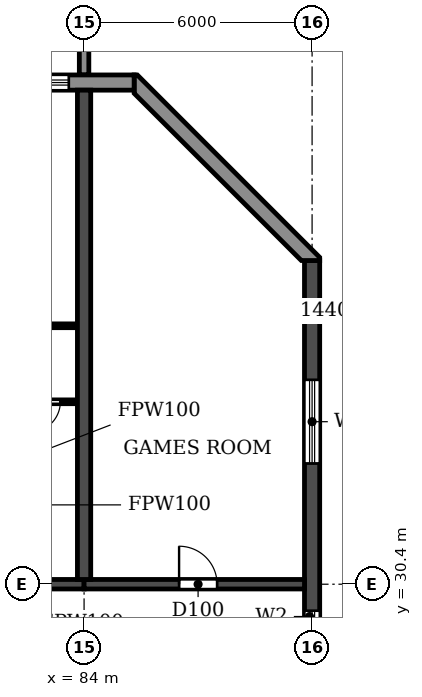
"""IFC4 building model, lengths in metres.
Left out: names, types, materials, properties, quantities, classifications, styles, units other than length and angle.
Written with IfcOpenShell. Run it as: python <this file> out.ifc"""

import sys

from ifc_helpers import new_model, si_unit, direction, frame, frame_2d, origin, place, context, subcontext, project, spatial, polyline, rectangle, outline, extrude, source, transform, mapped, element, fill, save


model = new_model("IFC4")
c1 = context("Model", 3, precision=1e-05, world=origin(), true_north=direction((0.0, 1.0)))
c2 = subcontext(c1, "Body", "Model", "MODEL_VIEW")
j1 = project(units=[si_unit("LENGTHUNIT", "METRE"), si_unit("PLANEANGLEUNIT", "RADIAN")], contexts=[c1])
p1 = place(None, origin())
s1 = spatial("IfcSite", under=j1, at=p1, CompositionType="ELEMENT")
p2 = place(p1, origin())
s2 = spatial("IfcBuilding", under=s1, at=p2, CompositionType="ELEMENT")
p3 = place(p2, frame((0.0, 0.0, 109.2)))
s3 = spatial("IfcBuildingStorey", under=s2, at=p3, CompositionType="ELEMENT", Elevation=109.2)
p4 = place(p3, frame((84.0, 30.525, 0.0), z_axis=(0.0, 0.0, 1.0), x_axis=(0.0, 1.0, 0.0)))
e1 = element("IfcWall", 1, at=p4, inside=s3, PredefinedType="SHEAR", context=c2, shape_type="SweptSolid", body=[
    extrude(rectangle(XDim=12.875, YDim=0.35, at=frame_2d((6.438, 0.0))), origin(), (0.0, 0.0, 1.0), 3.06),
])
p5 = place(p3, frame((90.0, 4.683, 0.0), z_axis=(0.0, 0.0, 1.0), x_axis=(0.0, 1.0, 0.0)))
e2 = element("IfcWall", 2, at=p5, inside=s3, PredefinedType="SHEAR", context=c2, shape_type="SweptSolid", body=[
    extrude(rectangle(XDim=34.234, YDim=0.4, at=frame_2d((17.117, 0.0))), origin(), (0.0, 0.0, 1.0), 3.06),
])
p6 = place(p5, frame((15.917, 0.0, 0.9)))
e3 = element("IfcOpeningElement", 3, at=p6, cuts=e2, PredefinedType="OPENING", context=c2, shape_type="SweptSolid", body=[
    extrude(rectangle(XDim=1.2, YDim=1.5, at=frame_2d((0.6, 0.75))), frame((0.0, 0.21, 0.0), z_axis=(0.0, -1.0, 0.0), x_axis=(1.0, 0.0, 0.0)), (0.0, 0.0, 1.0), 0.42),
])
p7 = place(p5, frame((23.817, 0.0, 0.9)))
e4 = element("IfcOpeningElement", 4, at=p7, cuts=e2, PredefinedType="OPENING", context=c2, shape_type="SweptSolid", body=[
    extrude(rectangle(XDim=1.2, YDim=1.5, at=frame_2d((0.6, 0.75))), frame((0.0, 0.21, 0.0), z_axis=(0.0, -1.0, 0.0), x_axis=(1.0, 0.0, 0.0)), (0.0, 0.0, 1.0), 0.42),
])
p8 = place(p5, frame((8.017, 0.0, 0.9)))
e5 = element("IfcOpeningElement", 5, at=p8, cuts=e2, PredefinedType="OPENING", context=c2, shape_type="SweptSolid", body=[
    extrude(rectangle(XDim=1.2, YDim=1.5, at=frame_2d((0.6, 0.75))), frame((0.0, 0.21, 0.0), z_axis=(0.0, -1.0, 0.0), x_axis=(1.0, 0.0, 0.0)), (0.0, 0.0, 1.0), 0.42),
])
p9 = place(p5, frame((28.894, 0.0, 0.6)))
e6 = element("IfcOpeningElement", 6, at=p9, cuts=e2, PredefinedType="OPENING", context=c2, shape_type="SweptSolid", body=[
    extrude(rectangle(XDim=2.2, YDim=1.8, at=frame_2d((1.1, 0.9))), frame((0.0, 0.21, 0.0), z_axis=(0.0, -1.0, 0.0), x_axis=(1.0, 0.0, 0.0)), (0.0, 0.0, 1.0), 0.42),
])
p10 = place(p5, frame((2.541, 0.0, 0.6)))
e7 = element("IfcOpeningElement", 7, at=p10, cuts=e2, PredefinedType="OPENING", context=c2, shape_type="SweptSolid", body=[
    extrude(rectangle(XDim=2.2, YDim=1.8, at=frame_2d((1.1, 0.9))), frame((0.0, 0.21, 0.0), z_axis=(0.0, -1.0, 0.0), x_axis=(1.0, 0.0, 0.0)), (0.0, 0.0, 1.0), 0.42),
])
p11 = place(p3, frame((78.0, 30.4, 0.0), z_axis=(0.0, 0.0, 1.0), x_axis=(1.0, 0.0, 0.0)))
e8 = element("IfcWall", 8, at=p11, inside=s3, PredefinedType="SHEAR", context=c2, shape_type="SweptSolid", body=[
    extrude(rectangle(XDim=6.0, YDim=0.25, at=frame_2d((3.0, 0.0))), origin(), (0.0, 0.0, 1.0), 2.46),
])
p12 = place(p11, frame((2.55, 0.0, 0.0)))
e9 = element("IfcOpeningElement", 9, at=p12, cuts=e8, PredefinedType="OPENING", context=c2, shape_type="SweptSolid", body=[
    extrude(rectangle(XDim=1.0, YDim=2.1, at=frame_2d((0.5, 1.05))), frame((0.0, 0.135, 0.0), z_axis=(0.0, -1.0, 0.0), x_axis=(1.0, 0.0, 0.0)), (0.0, 0.0, 1.0), 0.27),
])
p13 = place(p3, frame((84.0, 30.4, 0.0), z_axis=(0.0, 0.0, 1.0), x_axis=(1.0, 0.0, 0.0)))
e10 = element("IfcWall", 10, at=p13, inside=s3, PredefinedType="SHEAR", context=c2, shape_type="SweptSolid", body=[
    extrude(rectangle(XDim=5.8, YDim=0.25, at=frame_2d((2.9, 0.0))), origin(), (0.0, 0.0, 1.0), 2.46),
])
p14 = place(p13, frame((2.5, 0.0, 0.0)))
e11 = element("IfcOpeningElement", 11, at=p14, cuts=e10, PredefinedType="OPENING", context=c2, shape_type="SweptSolid", body=[
    extrude(rectangle(XDim=1.0, YDim=2.1, at=frame_2d((0.5, 1.05))), frame((0.0, 0.135, 0.0), z_axis=(0.0, -1.0, 0.0), x_axis=(1.0, 0.0, 0.0)), (0.0, 0.0, 1.0), 0.27),
])
p15 = place(p3, origin())
e12 = element("IfcWall", 12, at=p15, inside=s3, PredefinedType="STANDARD", context=c2, shape_type="SweptSolid", body=[
    extrude(outline(polyline([(90.2, 38.917), (90.2, 39.0), (85.4, 43.8), (85.317, 43.8), (85.317, 43.317), (89.717, 38.917), (90.2, 38.917)])), origin(), (0.0, 0.0, 1.0), 3.06),
])
p16 = place(p3, frame((85.317, 43.6, 0.0), z_axis=(0.0, 0.0, 1.0), x_axis=(-1.0, 0.0, 0.0)))
e13 = element("IfcWall", 13, at=p16, inside=s3, PredefinedType="STANDARD", context=c2, shape_type="SweptSolid", body=[
    extrude(rectangle(XDim=68.634, YDim=0.4, at=frame_2d((34.317, 0.0))), origin(), (0.0, 0.0, 1.0), 3.06),
])
p17 = place(p16, frame((64.917, 0.0, 0.0)))
e14 = element("IfcOpeningElement", 14, at=p17, cuts=e13, PredefinedType="OPENING", context=c2, shape_type="SweptSolid", body=[
    extrude(rectangle(XDim=1.8, YDim=2.4, at=frame_2d((0.9, 1.2))), frame((0.0, 0.21, 0.0), z_axis=(0.0, -1.0, 0.0), x_axis=(1.0, 0.0, 0.0)), (0.0, 0.0, 1.0), 0.42),
])
p18 = place(p16, frame((61.717, 0.0, 0.9)))
e15 = element("IfcOpeningElement", 15, at=p18, cuts=e13, PredefinedType="OPENING", context=c2, shape_type="SweptSolid", body=[
    extrude(rectangle(XDim=2.2, YDim=1.5, at=frame_2d((1.1, 0.75))), frame((0.0, 0.21, 0.0), z_axis=(0.0, -1.0, 0.0), x_axis=(1.0, 0.0, 0.0)), (0.0, 0.0, 1.0), 0.42),
])
p19 = place(p16, frame((58.717, 0.0, 0.9)))
e16 = element("IfcOpeningElement", 16, at=p19, cuts=e13, PredefinedType="OPENING", context=c2, shape_type="SweptSolid", body=[
    extrude(rectangle(XDim=2.2, YDim=1.5, at=frame_2d((1.1, 0.75))), frame((0.0, 0.21, 0.0), z_axis=(0.0, -1.0, 0.0), x_axis=(1.0, 0.0, 0.0)), (0.0, 0.0, 1.0), 0.42),
])
p20 = place(p16, frame((55.917, 0.0, 0.0)))
e17 = element("IfcOpeningElement", 17, at=p20, cuts=e13, PredefinedType="OPENING", context=c2, shape_type="SweptSolid", body=[
    extrude(rectangle(XDim=1.8, YDim=2.4, at=frame_2d((0.9, 1.2))), frame((0.0, 0.21, 0.0), z_axis=(0.0, -1.0, 0.0), x_axis=(1.0, 0.0, 0.0)), (0.0, 0.0, 1.0), 0.42),
])
p21 = place(p16, frame((52.917, 0.0, 0.0)))
e18 = element("IfcOpeningElement", 18, at=p21, cuts=e13, PredefinedType="OPENING", context=c2, shape_type="SweptSolid", body=[
    extrude(rectangle(XDim=1.8, YDim=2.4, at=frame_2d((0.9, 1.2))), frame((0.0, 0.21, 0.0), z_axis=(0.0, -1.0, 0.0), x_axis=(1.0, 0.0, 0.0)), (0.0, 0.0, 1.0), 0.42),
])
p22 = place(p16, frame((49.717, 0.0, 0.9)))
e19 = element("IfcOpeningElement", 19, at=p22, cuts=e13, PredefinedType="OPENING", context=c2, shape_type="SweptSolid", body=[
    extrude(rectangle(XDim=2.2, YDim=1.5, at=frame_2d((1.1, 0.75))), frame((0.0, 0.21, 0.0), z_axis=(0.0, -1.0, 0.0), x_axis=(1.0, 0.0, 0.0)), (0.0, 0.0, 1.0), 0.42),
])
p23 = place(p16, frame((46.717, 0.0, 0.9)))
e20 = element("IfcOpeningElement", 20, at=p23, cuts=e13, PredefinedType="OPENING", context=c2, shape_type="SweptSolid", body=[
    extrude(rectangle(XDim=2.2, YDim=1.5, at=frame_2d((1.1, 0.75))), frame((0.0, 0.21, 0.0), z_axis=(0.0, -1.0, 0.0), x_axis=(1.0, 0.0, 0.0)), (0.0, 0.0, 1.0), 0.42),
])
p24 = place(p16, frame((43.917, 0.0, 0.0)))
e21 = element("IfcOpeningElement", 21, at=p24, cuts=e13, PredefinedType="OPENING", context=c2, shape_type="SweptSolid", body=[
    extrude(rectangle(XDim=1.8, YDim=2.4, at=frame_2d((0.9, 1.2))), frame((0.0, 0.21, 0.0), z_axis=(0.0, -1.0, 0.0), x_axis=(1.0, 0.0, 0.0)), (0.0, 0.0, 1.0), 0.42),
])
p25 = place(p16, frame((40.717, 0.0, 0.9)))
e22 = element("IfcOpeningElement", 22, at=p25, cuts=e13, PredefinedType="OPENING", context=c2, shape_type="SweptSolid", body=[
    extrude(rectangle(XDim=2.2, YDim=1.5, at=frame_2d((1.1, 0.75))), frame((0.0, 0.21, 0.0), z_axis=(0.0, -1.0, 0.0), x_axis=(1.0, 0.0, 0.0)), (0.0, 0.0, 1.0), 0.42),
])
p26 = place(p16, frame((37.717, 0.0, 0.9)))
e23 = element("IfcOpeningElement", 23, at=p26, cuts=e13, PredefinedType="OPENING", context=c2, shape_type="SweptSolid", body=[
    extrude(rectangle(XDim=2.2, YDim=1.5, at=frame_2d((1.1, 0.75))), frame((0.0, 0.21, 0.0), z_axis=(0.0, -1.0, 0.0), x_axis=(1.0, 0.0, 0.0)), (0.0, 0.0, 1.0), 0.42),
])
p27 = place(p16, frame((34.917, 0.0, 0.0)))
e24 = element("IfcOpeningElement", 24, at=p27, cuts=e13, PredefinedType="OPENING", context=c2, shape_type="SweptSolid", body=[
    extrude(rectangle(XDim=1.8, YDim=2.4, at=frame_2d((0.9, 1.2))), frame((0.0, 0.21, 0.0), z_axis=(0.0, -1.0, 0.0), x_axis=(1.0, 0.0, 0.0)), (0.0, 0.0, 1.0), 0.42),
])
p28 = place(p16, frame((31.717, 0.0, 0.9)))
e25 = element("IfcOpeningElement", 25, at=p28, cuts=e13, PredefinedType="OPENING", context=c2, shape_type="SweptSolid", body=[
    extrude(rectangle(XDim=2.2, YDim=1.5, at=frame_2d((1.1, 0.75))), frame((0.0, 0.21, 0.0), z_axis=(0.0, -1.0, 0.0), x_axis=(1.0, 0.0, 0.0)), (0.0, 0.0, 1.0), 0.42),
])
p29 = place(p16, frame((28.917, 0.0, 0.0)))
e26 = element("IfcOpeningElement", 26, at=p29, cuts=e13, PredefinedType="OPENING", context=c2, shape_type="SweptSolid", body=[
    extrude(rectangle(XDim=1.8, YDim=2.4, at=frame_2d((0.9, 1.2))), frame((0.0, 0.21, 0.0), z_axis=(0.0, -1.0, 0.0), x_axis=(1.0, 0.0, 0.0)), (0.0, 0.0, 1.0), 0.42),
])
p30 = place(p16, frame((25.717, 0.0, 0.9)))
e27 = element("IfcOpeningElement", 27, at=p30, cuts=e13, PredefinedType="OPENING", context=c2, shape_type="SweptSolid", body=[
    extrude(rectangle(XDim=2.2, YDim=1.5, at=frame_2d((1.1, 0.75))), frame((0.0, 0.21, 0.0), z_axis=(0.0, -1.0, 0.0), x_axis=(1.0, 0.0, 0.0)), (0.0, 0.0, 1.0), 0.42),
])
p31 = place(p16, frame((22.717, 0.0, 0.9)))
e28 = element("IfcOpeningElement", 28, at=p31, cuts=e13, PredefinedType="OPENING", context=c2, shape_type="SweptSolid", body=[
    extrude(rectangle(XDim=2.2, YDim=1.5, at=frame_2d((1.1, 0.75))), frame((0.0, 0.21, 0.0), z_axis=(0.0, -1.0, 0.0), x_axis=(1.0, 0.0, 0.0)), (0.0, 0.0, 1.0), 0.42),
])
p32 = place(p16, frame((19.917, 0.0, 0.0)))
e29 = element("IfcOpeningElement", 29, at=p32, cuts=e13, PredefinedType="OPENING", context=c2, shape_type="SweptSolid", body=[
    extrude(rectangle(XDim=1.8, YDim=2.4, at=frame_2d((0.9, 1.2))), frame((0.0, 0.21, 0.0), z_axis=(0.0, -1.0, 0.0), x_axis=(1.0, 0.0, 0.0)), (0.0, 0.0, 1.0), 0.42),
])
p33 = place(p16, frame((16.717, 0.0, 0.9)))
e30 = element("IfcOpeningElement", 30, at=p33, cuts=e13, PredefinedType="OPENING", context=c2, shape_type="SweptSolid", body=[
    extrude(rectangle(XDim=2.2, YDim=1.5, at=frame_2d((1.1, 0.75))), frame((0.0, 0.21, 0.0), z_axis=(0.0, -1.0, 0.0), x_axis=(1.0, 0.0, 0.0)), (0.0, 0.0, 1.0), 0.42),
])
p34 = place(p16, frame((13.917, 0.0, 0.0)))
e31 = element("IfcOpeningElement", 31, at=p34, cuts=e13, PredefinedType="OPENING", context=c2, shape_type="SweptSolid", body=[
    extrude(rectangle(XDim=1.8, YDim=2.4, at=frame_2d((0.9, 1.2))), frame((0.0, 0.21, 0.0), z_axis=(0.0, -1.0, 0.0), x_axis=(1.0, 0.0, 0.0)), (0.0, 0.0, 1.0), 0.42),
])
p35 = place(p16, frame((10.717, 0.0, 0.9)))
e32 = element("IfcOpeningElement", 32, at=p35, cuts=e13, PredefinedType="OPENING", context=c2, shape_type="SweptSolid", body=[
    extrude(rectangle(XDim=2.2, YDim=1.5, at=frame_2d((1.1, 0.75))), frame((0.0, 0.21, 0.0), z_axis=(0.0, -1.0, 0.0), x_axis=(1.0, 0.0, 0.0)), (0.0, 0.0, 1.0), 0.42),
])
p36 = place(p16, frame((7.717, 0.0, 0.9)))
e33 = element("IfcOpeningElement", 33, at=p36, cuts=e13, PredefinedType="OPENING", context=c2, shape_type="SweptSolid", body=[
    extrude(rectangle(XDim=2.2, YDim=1.5, at=frame_2d((1.1, 0.75))), frame((0.0, 0.21, 0.0), z_axis=(0.0, -1.0, 0.0), x_axis=(1.0, 0.0, 0.0)), (0.0, 0.0, 1.0), 0.42),
])
p37 = place(p16, frame((4.917, 0.0, 0.0)))
e34 = element("IfcOpeningElement", 34, at=p37, cuts=e13, PredefinedType="OPENING", context=c2, shape_type="SweptSolid", body=[
    extrude(rectangle(XDim=1.8, YDim=2.4, at=frame_2d((0.9, 1.2))), frame((0.0, 0.21, 0.0), z_axis=(0.0, -1.0, 0.0), x_axis=(1.0, 0.0, 0.0)), (0.0, 0.0, 1.0), 0.42),
])
p38 = place(p16, frame((1.717, 0.0, 0.9)))
e35 = element("IfcOpeningElement", 35, at=p38, cuts=e13, PredefinedType="OPENING", context=c2, shape_type="SweptSolid", body=[
    extrude(rectangle(XDim=2.2, YDim=1.5, at=frame_2d((1.1, 0.75))), frame((0.0, 0.21, 0.0), z_axis=(0.0, -1.0, 0.0), x_axis=(1.0, 0.0, 0.0)), (0.0, 0.0, 1.0), 0.42),
])
m1 = source(origin(), c2, "Body", "SweptSolid", [
    extrude(outline(polyline([(0.0, 0.0), (0.25, 0.0), (0.25, 3.1), (0.0, 3.1), (0.0, 0.0)])), origin(), (0.0, 0.0, 1.0), 3.1),
])
p39 = place(p3, frame((83.875, 43.8, 0.0)))
e36 = element("IfcWall", 36, at=p39, inside=s3, PredefinedType="STANDARD", context=c2, shape_type="MappedRepresentation", body=[
    mapped(m1, transform((0.0, 0.0, 0.0))),
])
p40 = place(p3, frame((81.9, 35.2, 0.0), z_axis=(0.0, 0.0, 1.0), x_axis=(1.0, 0.0, 0.0)))
e37 = element("IfcWall", 37, at=p40, inside=s3, PredefinedType="PARTITIONING", context=c2, shape_type="SweptSolid", body=[
    extrude(rectangle(XDim=1.915, YDim=0.1, at=frame_2d((0.958, 0.0))), origin(), (0.0, 0.0, 1.0), 3.06),
])
p41 = place(p40, frame((0.675, 0.0, 0.0)))
e38 = element("IfcOpeningElement", 38, at=p41, cuts=e37, PredefinedType="OPENING", context=c2, shape_type="SweptSolid", body=[
    extrude(rectangle(XDim=0.8, YDim=2.1, at=frame_2d((0.4, 1.05))), frame((0.0, 0.06, 0.0), z_axis=(0.0, -1.0, 0.0), x_axis=(1.0, 0.0, 0.0)), (0.0, 0.0, 1.0), 0.12),
])
p42 = place(p3, frame((80.95, 37.2, 0.0), z_axis=(0.0, 0.0, 1.0), x_axis=(1.0, 0.0, 0.0)))
e39 = element("IfcWall", 39, at=p42, inside=s3, PredefinedType="PARTITIONING", context=c2, shape_type="SweptSolid", body=[
    extrude(rectangle(XDim=2.865, YDim=0.1, at=frame_2d((1.433, 0.0))), origin(), (0.0, 0.0, 1.0), 3.06),
])
p43 = place(p42, frame((0.55, 0.0, 0.0)))
e40 = element("IfcOpeningElement", 40, at=p43, cuts=e39, PredefinedType="OPENING", context=c2, shape_type="SweptSolid", body=[
    extrude(rectangle(XDim=0.9, YDim=2.1, at=frame_2d((0.45, 1.05))), frame((0.0, 0.06, 0.0), z_axis=(0.0, -1.0, 0.0), x_axis=(1.0, 0.0, 0.0)), (0.0, 0.0, 1.0), 0.12),
])
p44 = place(p7, origin())
e41 = element("IfcWindow", 41, at=p44, inside=s3, PartitioningType="SINGLE_PANEL", PredefinedType="WINDOW", context=c2, shape_type="SweptSolid", body=[
    extrude(rectangle(XDim=1.2, YDim=1.5, at=frame_2d((0.6, 0.75))), frame((0.0, 0.03, 0.0), z_axis=(0.0, -1.0, 0.0), x_axis=(1.0, 0.0, 0.0)), (0.0, 0.0, 1.0), 0.06),
])
fill(e4, e41)
p45 = place(p9, origin())
e42 = element("IfcWindow", 42, at=p45, inside=s3, PartitioningType="DOUBLE_PANEL_HORIZONTAL", PredefinedType="WINDOW", context=c2, shape_type="SweptSolid", body=[
    extrude(rectangle(XDim=2.2, YDim=1.8, at=frame_2d((1.1, 0.9))), frame((0.0, 0.03, 0.0), z_axis=(0.0, -1.0, 0.0), x_axis=(1.0, 0.0, 0.0)), (0.0, 0.0, 1.0), 0.06),
])
fill(e6, e42)
p46 = place(p38, origin())
e43 = element("IfcWindow", 43, at=p46, inside=s3, PartitioningType="DOUBLE_PANEL_HORIZONTAL", PredefinedType="WINDOW", context=c2, shape_type="SweptSolid", body=[
    extrude(rectangle(XDim=2.2, YDim=1.5, at=frame_2d((1.1, 0.75))), frame((0.0, 0.03, 0.0), z_axis=(0.0, -1.0, 0.0), x_axis=(1.0, 0.0, 0.0)), (0.0, 0.0, 1.0), 0.06),
])
fill(e35, e43)
p47 = place(p41, frame((0.8, 0.0, 0.0), z_axis=(0.0, 0.0, 1.0), x_axis=(-1.0, 0.0, 0.0)))
e44 = element("IfcDoor", 44, at=p47, inside=s3, OperationType="SINGLE_SWING_RIGHT", PredefinedType="DOOR", context=c2, shape_type="SweptSolid", body=[
    extrude(rectangle(XDim=0.8, YDim=2.1, at=frame_2d((0.4, 1.05))), frame((0.0, 0.025, 0.0), z_axis=(0.0, -1.0, 0.0), x_axis=(1.0, 0.0, 0.0)), (0.0, 0.0, 1.0), 0.05),
])
fill(e38, e44)
p48 = place(p14, origin())
e45 = element("IfcDoor", 45, at=p48, inside=s3, OperationType="SINGLE_SWING_LEFT", PredefinedType="DOOR", context=c2, shape_type="SweptSolid", body=[
    extrude(rectangle(XDim=1.0, YDim=2.1, at=frame_2d((0.5, 1.05))), frame((0.0, 0.025, 0.0), z_axis=(0.0, -1.0, 0.0), x_axis=(1.0, 0.0, 0.0)), (0.0, 0.0, 1.0), 0.05),
])
fill(e11, e45)
save(model, sys.argv[1])
